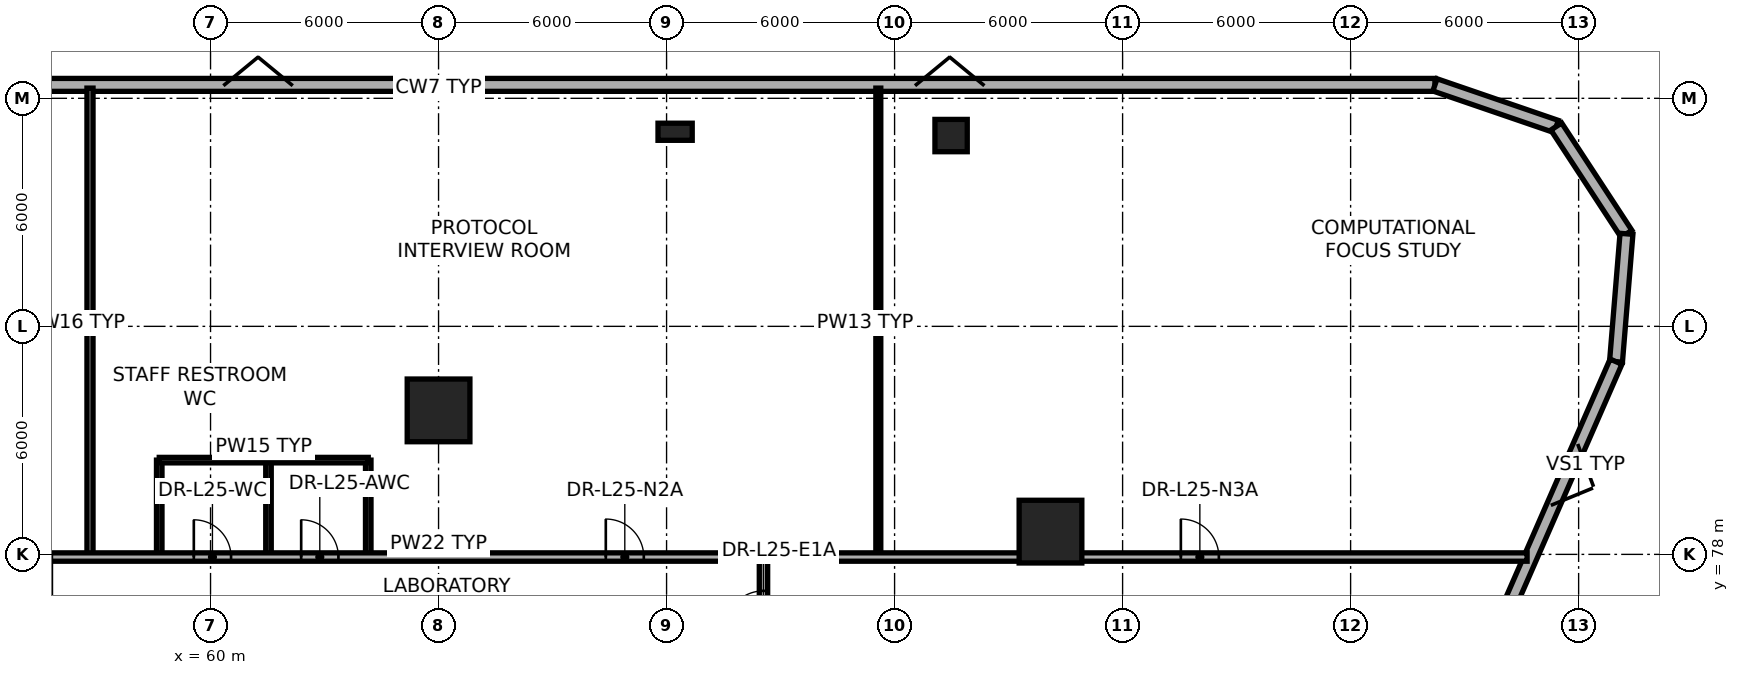
"""IFC4 building model, lengths in metres.
Left out: names, types, materials, properties, quantities, classifications, styles, units other than length and angle.
Written with IfcOpenShell. Run it as: python <this file> out.ifc"""

import sys

from ifc_helpers import new_model, si_unit, direction, frame, frame_2d, origin, origin_2d, place, context, subcontext, project, spatial, rectangle, extrude, element, fill, save


model = new_model("IFC4")
c1 = context("Model", 3, precision=1e-05, world=origin(), true_north=direction((0.0, 1.0)))
c2 = subcontext(c1, "Body", "Model", "MODEL_VIEW")
j1 = project(units=[si_unit("LENGTHUNIT", "METRE"), si_unit("PLANEANGLEUNIT", "RADIAN")], contexts=[c1])
p1 = place(None, origin())
s1 = spatial("IfcSite", under=j1, at=p1, CompositionType="ELEMENT")
p2 = place(p1, origin())
s2 = spatial("IfcBuilding", under=s1, at=p2, CompositionType="ELEMENT")
p3 = place(p2, frame((0.0, 0.0, 96.9)))
s3 = spatial("IfcBuildingStorey", under=s2, at=p3, CompositionType="ELEMENT", Elevation=96.9)
for number, where, z_axis, x_axis in (
    (1, (82.102, 78.599, 0.0), (0.0, 0.0, 1.0), (1.0, 0.0, 0.0)),
    (2, (66.0, 81.789, 0.0), (0.0, 0.0, 1.0), (1.0, 0.0, 0.0)),
):
    element("IfcColumn", number, at=place(p3, frame(where, z_axis=z_axis, x_axis=x_axis)), inside=s3, PredefinedType="COLUMN", context=c2, shape_type="SweptSolid", body=[
        extrude(rectangle(XDim=1.65, YDim=1.65, at=origin_2d()), origin(), (0.0, 0.0, 1.0), 3.65),
    ])
p4 = place(p3, frame((79.536, 89.081, 0.003), z_axis=(-0.026841076243, -0.033534611465, 0.999077067328), x_axis=(-0.780716755404, 0.624885067698, 0.0)))
e3 = element("IfcColumn", 3, at=p4, inside=s3, PredefinedType="COLUMN", context=c2, shape_type="SweptSolid", body=[
    extrude(rectangle(XDim=0.85, YDim=0.85, at=origin_2d()), origin(), (0.0, 0.0, 1.0), 3.647),
])
p5 = place(p3, frame((72.247, 89.181, 0.003), z_axis=(-0.01238655289, -0.033544124313, 0.999360478022), x_axis=(-0.9380871136, 0.346399433166, 0.0)))
e4 = element("IfcColumn", 4, at=p5, inside=s3, PredefinedType="PILASTER", context=c2, shape_type="SweptSolid", body=[
    extrude(rectangle(XDim=0.9, YDim=0.45, at=origin_2d()), origin(), (0.0, 0.0, 1.0), 3.646),
])
p6 = place(p3, frame((39.781, 90.354, 0.0), z_axis=(0.0, 0.0, 1.0), x_axis=(1.0, 0.0, 0.0)))
e5 = element("IfcWall", 5, at=p6, inside=s3, PredefinedType="STANDARD", context=c2, shape_type="SweptSolid", body=[
    extrude(rectangle(XDim=52.438, YDim=0.34, at=frame_2d((26.219, 0.0))), origin(), (0.0, 0.0, 1.0), 0.85),
])
p7 = place(p3, frame((92.219, 90.354, 0.0), z_axis=(0.0, 0.0, 1.0), x_axis=(0.945876171039, -0.324527763157, 0.0)))
e6 = element("IfcWall", 6, at=p7, inside=s3, PredefinedType="STANDARD", context=c2, shape_type="SweptSolid", body=[
    extrude(rectangle(XDim=3.375, YDim=0.34, at=frame_2d((1.688, 0.0))), origin(), (0.0, 0.0, 1.0), 3.375),
])
p8 = place(p3, frame((95.411, 89.258, 0.0), z_axis=(0.0, 0.0, 1.0), x_axis=(0.547467638162, -0.83682685495, 0.0)))
e7 = element("IfcWall", 7, at=p8, inside=s3, PredefinedType="STANDARD", context=c2, shape_type="SweptSolid", body=[
    extrude(rectangle(XDim=3.375, YDim=0.34, at=frame_2d((1.688, 0.0))), origin(), (0.0, 0.0, 1.0), 3.375),
])
p9 = place(p3, frame((97.259, 86.434, 0.0), z_axis=(0.0, 0.0, 1.0), x_axis=(-0.08153066917, -0.996670833317, 0.0)))
e8 = element("IfcWall", 8, at=p9, inside=s3, PredefinedType="STANDARD", context=c2, shape_type="SweptSolid", body=[
    extrude(rectangle(XDim=3.375, YDim=0.34, at=frame_2d((1.688, 0.0))), origin(), (0.0, 0.0, 1.0), 3.375),
])
p10 = place(p3, frame((96.984, 83.071, 0.0), z_axis=(0.0, 0.0, 1.0), x_axis=(-0.400539645754, -0.916279429093, 0.0)))
e9 = element("IfcWall", 9, at=p10, inside=s3, PredefinedType="STANDARD", context=c2, shape_type="SweptSolid", body=[
    extrude(rectangle(XDim=26.93, YDim=0.34, at=frame_2d((13.465, 0.0))), origin(), (0.0, 0.0, 1.0), 0.85),
])
p11 = place(p3, frame((61.235, 23.092, 0.0), z_axis=(0.0, 0.0, 1.0), x_axis=(-0.400542161224, 0.916278329484, 0.0)))
e10 = element("IfcWall", 10, at=p11, inside=s3, PredefinedType="STANDARD", context=c2, shape_type="SweptSolid", body=[
    extrude(rectangle(XDim=65.459, YDim=0.34, at=frame_2d((32.73, 0.0))), origin(), (0.0, 0.0, 1.0), 0.85),
])
p12 = place(p3, frame((58.65, 77.93, 0.0), z_axis=(0.0, 0.0, 1.0), x_axis=(0.0, 1.0, 0.0)))
e11 = element("IfcWall", 11, at=p12, inside=s3, PredefinedType="PARTITIONING", context=c2, shape_type="SweptSolid", body=[
    extrude(rectangle(XDim=2.55, YDim=0.145, at=frame_2d((1.275, 0.0))), origin(), (0.0, 0.0, 1.0), 2.655),
])
for number, where, z_axis, x_axis in (
    (12, (61.525, 77.93, 0.0), (0.0, 0.0, 1.0), (0.0, 1.0, 0.0)),
    (13, (64.15, 77.93, 0.0), (0.0, 0.0, 1.0), (0.0, 1.0, 0.0)),
):
    element("IfcWall", number, at=place(p3, frame(where, z_axis=z_axis, x_axis=x_axis)), inside=s3, PredefinedType="PARTITIONING", context=c2, shape_type="SweptSolid", body=[
        extrude(rectangle(XDim=2.55, YDim=0.145, at=frame_2d((1.275, 0.0))), origin(), (0.0, 0.0, 1.0), 3.375),
    ])
p13 = place(p3, frame((58.65, 80.48, 0.0), z_axis=(0.0, 0.0, 1.0), x_axis=(1.0, 0.0, 0.0)))
e14 = element("IfcWall", 14, at=p13, inside=s3, PredefinedType="PARTITIONING", context=c2, shape_type="SweptSolid", body=[
    extrude(rectangle(XDim=5.5, YDim=0.145, at=frame_2d((2.75, 0.0))), origin(), (0.0, 0.0, 1.0), 2.655),
])
p14 = place(p3, frame((56.828, 77.93, 0.0), z_axis=(0.0, 0.0, 1.0), x_axis=(0.0, 1.0, 0.0)))
e15 = element("IfcWall", 15, at=p14, inside=s3, PredefinedType="PARTITIONING", context=c2, shape_type="SweptSolid", body=[
    extrude(rectangle(XDim=12.339, YDim=0.16, at=frame_2d((6.169, 0.0))), origin(), (0.0, 0.0, 1.0), 2.505),
])
p15 = place(p3, frame((77.572, 77.93, 0.0), z_axis=(0.0, 0.0, 1.0), x_axis=(0.0, 1.0, 0.0)))
e16 = element("IfcWall", 16, at=p15, inside=s3, PredefinedType="PARTITIONING", context=c2, shape_type="SweptSolid", body=[
    extrude(rectangle(XDim=12.339, YDim=0.13, at=frame_2d((6.169, 0.0))), origin(), (0.0, 0.0, 1.0), 2.505),
])
p16 = place(p3, frame((37.356, 77.93, 0.0), z_axis=(0.0, 0.0, 1.0), x_axis=(1.0, 0.0, 0.0)))
e17 = element("IfcWall", 17, at=p16, inside=s3, PredefinedType="PARTITIONING", context=c2, shape_type="SweptSolid", body=[
    extrude(rectangle(XDim=57.288, YDim=0.22, at=frame_2d((28.644, 0.0))), origin(), (0.0, 0.0, 1.0), 2.505),
])
p17 = place(p16, frame((22.204, 0.0, 0.0)))
e18 = element("IfcOpeningElement", 18, at=p17, cuts=e17, PredefinedType="OPENING", context=c2, shape_type="SweptSolid", body=[
    extrude(rectangle(XDim=0.98, YDim=2.1, at=frame_2d((0.49, 1.05))), frame((0.0, 0.12, 0.0), z_axis=(0.0, -1.0, 0.0), x_axis=(1.0, 0.0, 0.0)), (0.0, 0.0, 1.0), 0.24),
])
p18 = place(p16, frame((25.029, 0.0, 0.0)))
e19 = element("IfcOpeningElement", 19, at=p18, cuts=e17, PredefinedType="OPENING", context=c2, shape_type="SweptSolid", body=[
    extrude(rectangle(XDim=0.98, YDim=2.1, at=frame_2d((0.49, 1.05))), frame((0.0, 0.12, 0.0), z_axis=(0.0, -1.0, 0.0), x_axis=(1.0, 0.0, 0.0)), (0.0, 0.0, 1.0), 0.24),
])
p19 = place(p16, frame((9.311, 0.0, 0.0)))
e20 = element("IfcOpeningElement", 20, at=p19, cuts=e17, PredefinedType="OPENING", context=c2, shape_type="SweptSolid", body=[
    extrude(rectangle(XDim=1.0, YDim=2.1, at=frame_2d((0.5, 1.05))), frame((0.0, 0.12, 0.0), z_axis=(0.0, -1.0, 0.0), x_axis=(1.0, 0.0, 0.0)), (0.0, 0.0, 1.0), 0.24),
])
p20 = place(p16, frame((33.045, 0.0, 0.0)))
e21 = element("IfcOpeningElement", 21, at=p20, cuts=e17, PredefinedType="OPENING", context=c2, shape_type="SweptSolid", body=[
    extrude(rectangle(XDim=1.0, YDim=2.1, at=frame_2d((0.5, 1.05))), frame((0.0, 0.12, 0.0), z_axis=(0.0, -1.0, 0.0), x_axis=(1.0, 0.0, 0.0)), (0.0, 0.0, 1.0), 0.24),
])
p21 = place(p16, frame((48.177, 0.0, 0.0)))
e22 = element("IfcOpeningElement", 22, at=p21, cuts=e17, PredefinedType="OPENING", context=c2, shape_type="SweptSolid", body=[
    extrude(rectangle(XDim=1.0, YDim=2.1, at=frame_2d((0.5, 1.05))), frame((0.0, 0.12, 0.0), z_axis=(0.0, -1.0, 0.0), x_axis=(1.0, 0.0, 0.0)), (0.0, 0.0, 1.0), 0.24),
])
p22 = place(p3, frame((74.55, 75.15, 0.0), z_axis=(0.0, 0.0, 1.0), x_axis=(0.0, 1.0, 0.0)))
e23 = element("IfcWall", 23, at=p22, inside=s3, PredefinedType="PARTITIONING", context=c2, shape_type="SweptSolid", body=[
    extrude(rectangle(XDim=2.78, YDim=0.22, at=frame_2d((1.39, 0.0))), origin(), (0.0, 0.0, 1.0), 3.375),
])
p23 = place(p22, frame((0.89, 0.0, 0.0)))
e24 = element("IfcOpeningElement", 24, at=p23, cuts=e23, PredefinedType="OPENING", context=c2, shape_type="SweptSolid", body=[
    extrude(rectangle(XDim=1.0, YDim=2.1, at=frame_2d((0.5, 1.05))), frame((0.0, 0.12, 0.0), z_axis=(0.0, -1.0, 0.0), x_axis=(1.0, 0.0, 0.0)), (0.0, 0.0, 1.0), 0.24),
])
p24 = place(p17, origin())
e25 = element("IfcDoor", 25, at=p24, inside=s3, OperationType="SINGLE_SWING_LEFT", PredefinedType="DOOR", context=c2, shape_type="SweptSolid", body=[
    extrude(rectangle(XDim=0.98, YDim=2.1, at=frame_2d((0.49, 1.05))), frame((0.0, 0.025, 0.0), z_axis=(0.0, -1.0, 0.0), x_axis=(1.0, 0.0, 0.0)), (0.0, 0.0, 1.0), 0.05),
])
fill(e18, e25)
p25 = place(p18, origin())
e26 = element("IfcDoor", 26, at=p25, inside=s3, OperationType="SINGLE_SWING_LEFT", PredefinedType="DOOR", context=c2, shape_type="SweptSolid", body=[
    extrude(rectangle(XDim=0.98, YDim=2.1, at=frame_2d((0.49, 1.05))), frame((0.0, 0.025, 0.0), z_axis=(0.0, -1.0, 0.0), x_axis=(1.0, 0.0, 0.0)), (0.0, 0.0, 1.0), 0.05),
])
fill(e19, e26)
p26 = place(p20, origin())
e27 = element("IfcDoor", 27, at=p26, inside=s3, OperationType="SINGLE_SWING_LEFT", PredefinedType="DOOR", context=c2, shape_type="SweptSolid", body=[
    extrude(rectangle(XDim=1.0, YDim=2.1, at=frame_2d((0.5, 1.05))), frame((0.0, 0.025, 0.0), z_axis=(0.0, -1.0, 0.0), x_axis=(1.0, 0.0, 0.0)), (0.0, 0.0, 1.0), 0.05),
])
fill(e21, e27)
p27 = place(p21, origin())
e28 = element("IfcDoor", 28, at=p27, inside=s3, OperationType="SINGLE_SWING_LEFT", PredefinedType="DOOR", context=c2, shape_type="SweptSolid", body=[
    extrude(rectangle(XDim=1.0, YDim=2.1, at=frame_2d((0.5, 1.05))), frame((0.0, 0.025, 0.0), z_axis=(0.0, -1.0, 0.0), x_axis=(1.0, 0.0, 0.0)), (0.0, 0.0, 1.0), 0.05),
])
fill(e22, e28)
p28 = place(p23, origin())
e29 = element("IfcDoor", 29, at=p28, inside=s3, OperationType="SINGLE_SWING_LEFT", PredefinedType="DOOR", context=c2, shape_type="SweptSolid", body=[
    extrude(rectangle(XDim=1.0, YDim=2.1, at=frame_2d((0.5, 1.05))), frame((0.0, 0.025, 0.0), z_axis=(0.0, -1.0, 0.0), x_axis=(1.0, 0.0, 0.0)), (0.0, 0.0, 1.0), 0.05),
])
fill(e24, e29)
save(model, sys.argv[1])
